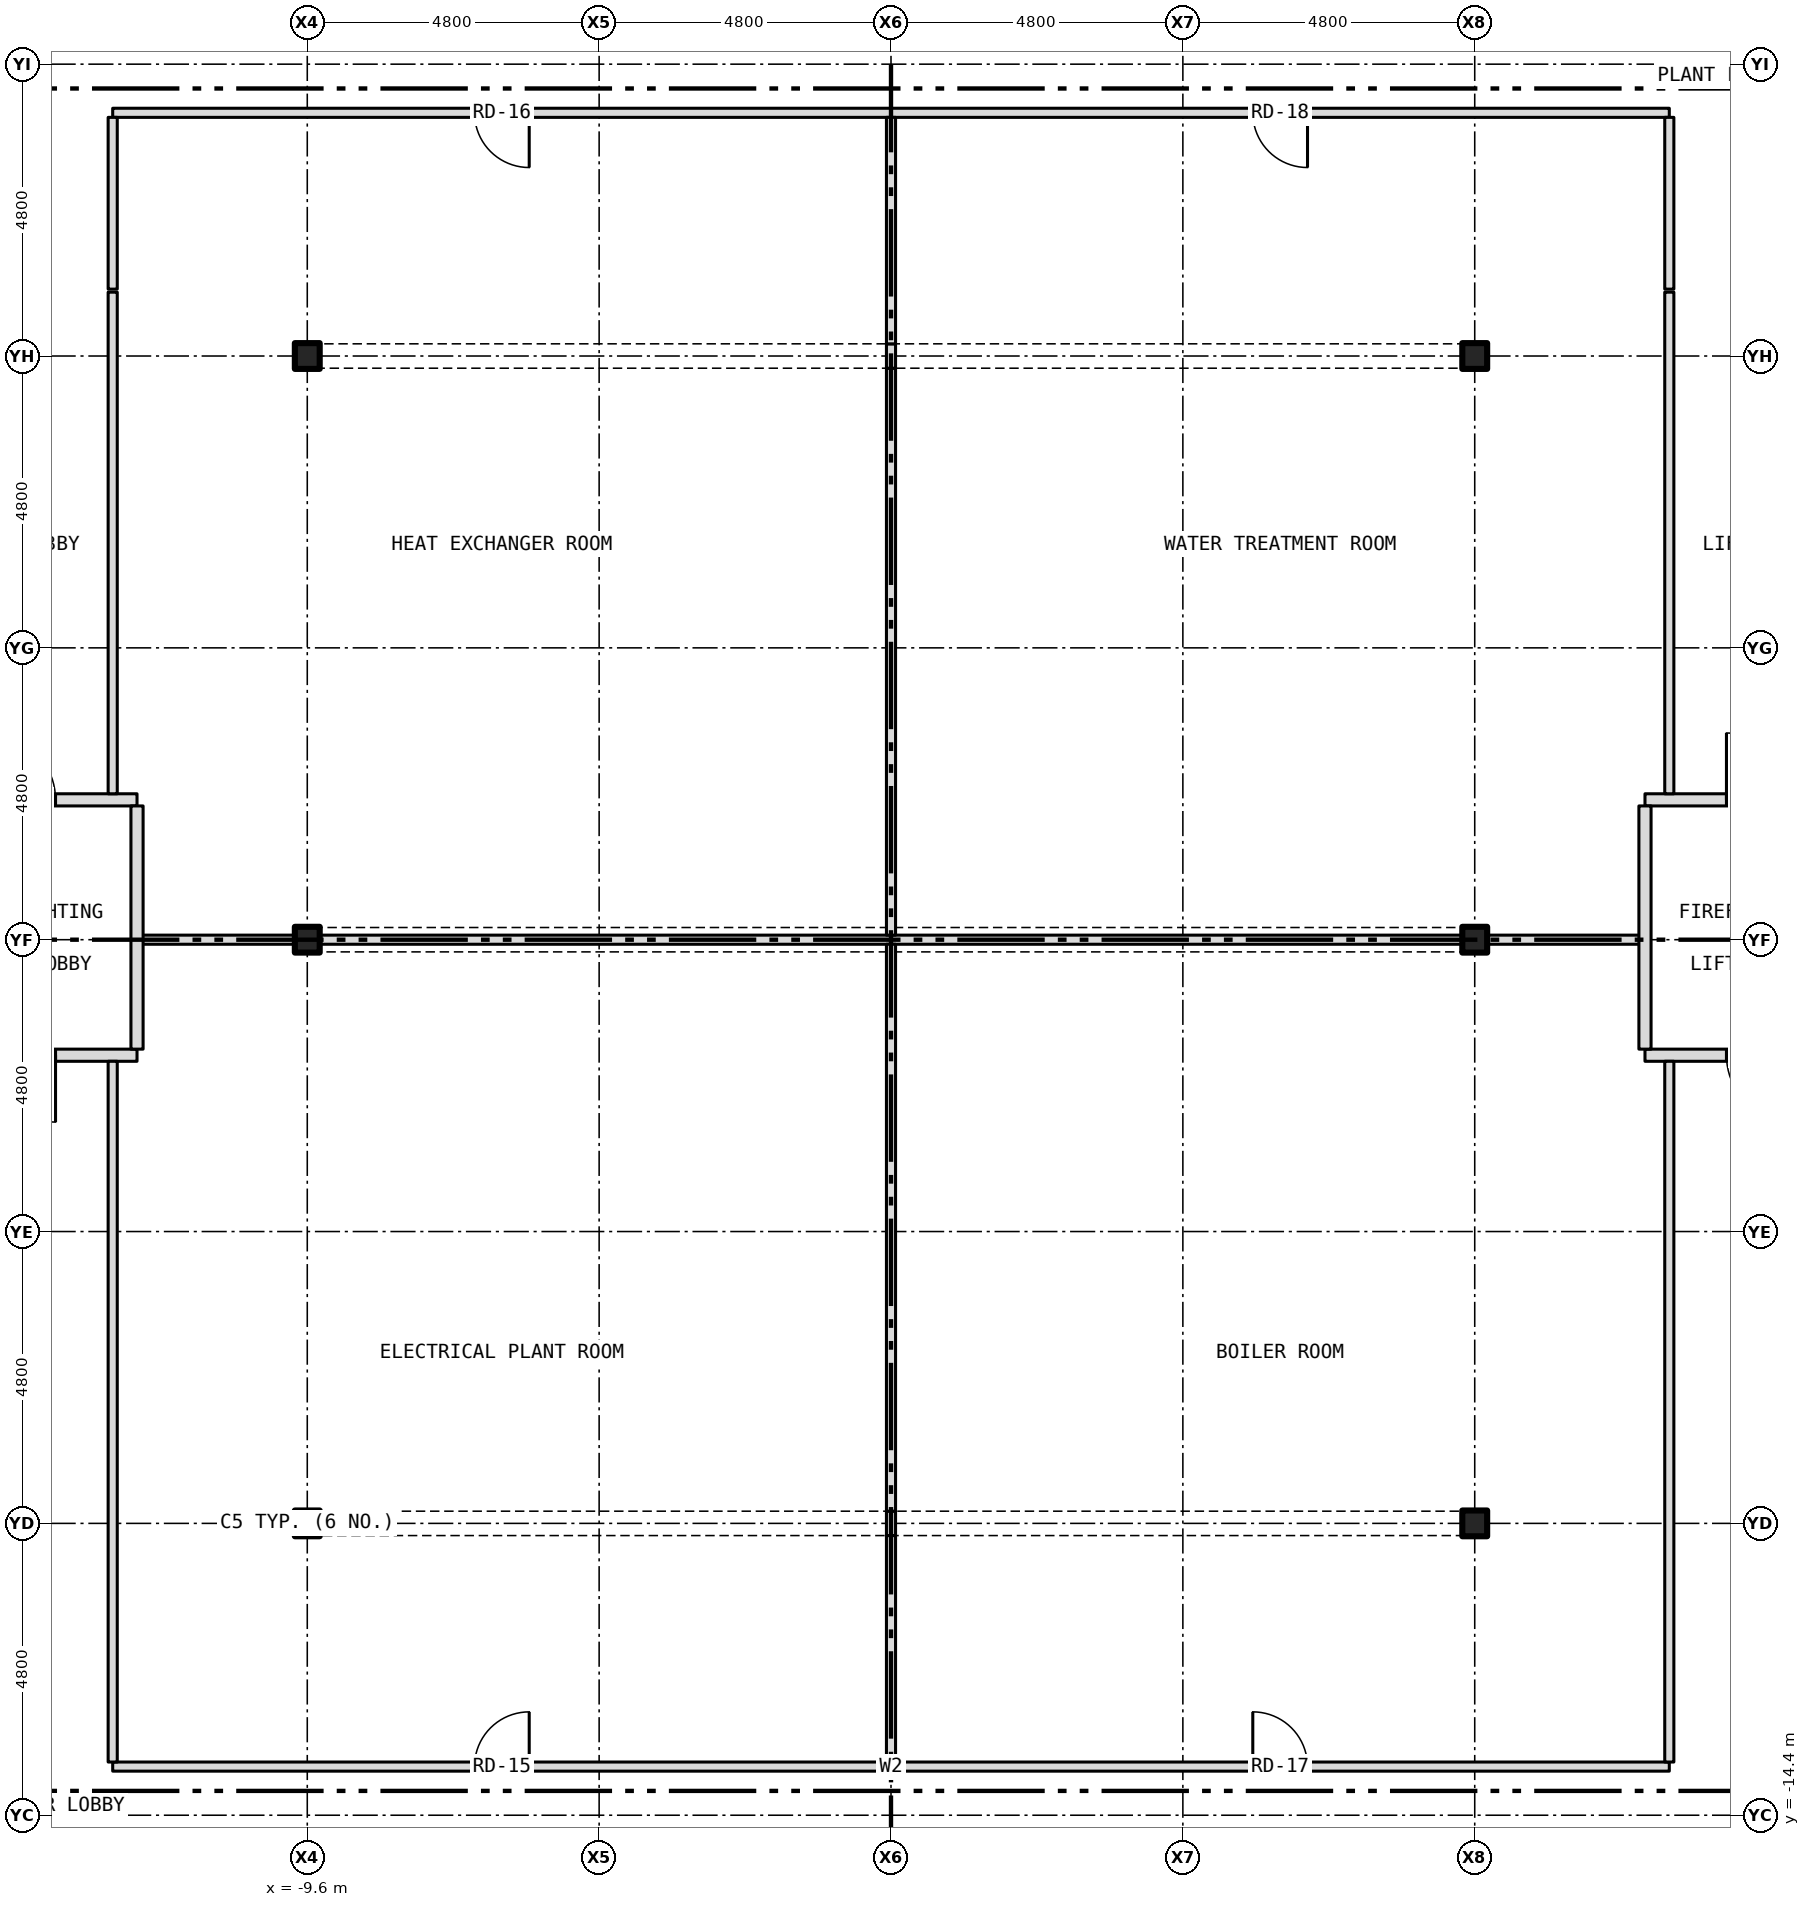
"""IFC4 building model, lengths in metres.
Left out: names, types, materials, properties, quantities, classifications, styles, units other than length and angle.
Written with IfcOpenShell. Run it as: python <this file> out.ifc"""

import sys

from ifc_helpers import new_model, si_unit, direction, frame, frame_2d, origin, origin_2d, place, context, subcontext, project, spatial, rectangle, i_section, extrude, element, fill, save


model = new_model("IFC4")
c1 = context("Model", 3, precision=1e-05, world=origin(), true_north=direction((0.0, 1.0)))
c2 = subcontext(c1, "Body", "Model", "MODEL_VIEW")
j1 = project(units=[si_unit("LENGTHUNIT", "METRE"), si_unit("PLANEANGLEUNIT", "RADIAN")], contexts=[c1])
p1 = place(None, origin())
s1 = spatial("IfcSite", under=j1, at=p1, CompositionType="ELEMENT")
p2 = place(p1, origin())
s2 = spatial("IfcBuilding", under=s1, at=p2, CompositionType="ELEMENT")
p3 = place(p2, frame((0.0, 0.0, 84.5)))
s3 = spatial("IfcBuildingStorey", under=s2, at=p3, CompositionType="ELEMENT", Elevation=84.5)
for number, where, z_axis, x_axis in (
    (1, (-9.6, -9.6, -0.3), (0.0, 0.0, 1.0), (1.0, 0.0, 0.0)),
    (2, (-9.6, 0.0, -0.3), (0.0, 0.0, 1.0), (1.0, 0.0, 0.0)),
    (3, (-9.6, 9.6, -0.3), (0.0, 0.0, 1.0), (1.0, 0.0, 0.0)),
    (4, (9.6, -9.6, -0.3), (0.0, 0.0, 1.0), (1.0, 0.0, 0.0)),
    (5, (9.6, 0.0, -0.3), (0.0, 0.0, 1.0), (1.0, 0.0, 0.0)),
    (6, (9.6, 9.6, -0.3), (0.0, 0.0, 1.0), (1.0, 0.0, 0.0)),
):
    element("IfcColumn", number, at=place(p3, frame(where, z_axis=z_axis, x_axis=x_axis)), inside=s3, PredefinedType="COLUMN", context=c2, shape_type="SweptSolid", body=[
        extrude(i_section(OverallWidth=0.409, OverallDepth=0.424, WebThickness=0.033, FlangeThickness=0.052, at=origin_2d()), origin(), (0.0, 0.0, 1.0), 4.65),
    ])
p4 = place(p3, frame((-12.8, -13.6, 0.0), z_axis=(0.0, 0.0, 1.0), x_axis=(1.0, 0.0, 0.0)))
e7 = element("IfcWall", 7, at=p4, inside=s3, PredefinedType="PARTITIONING", context=c2, shape_type="SweptSolid", body=[
    extrude(rectangle(XDim=25.6, YDim=0.15, at=frame_2d((12.8, 0.0))), origin(), (0.0, 0.0, 1.0), 4.35),
])
p5 = place(p4, frame((5.95, 0.0, 0.0)))
e8 = element("IfcOpeningElement", 8, at=p5, cuts=e7, PredefinedType="OPENING", context=c2, shape_type="SweptSolid", body=[
    extrude(rectangle(XDim=0.9, YDim=2.1, at=frame_2d((0.45, 1.05))), frame((0.0, 0.087, 0.0), z_axis=(0.0, -1.0, 0.0), x_axis=(1.0, 0.0, 0.0)), (0.0, 0.0, 1.0), 0.174),
])
p6 = place(p4, frame((18.75, 0.0, 0.0)))
e9 = element("IfcOpeningElement", 9, at=p6, cuts=e7, PredefinedType="OPENING", context=c2, shape_type="SweptSolid", body=[
    extrude(rectangle(XDim=0.9, YDim=2.1, at=frame_2d((0.45, 1.05))), frame((0.0, 0.087, 0.0), z_axis=(0.0, -1.0, 0.0), x_axis=(1.0, 0.0, 0.0)), (0.0, 0.0, 1.0), 0.174),
])
p7 = place(p3, frame((-15.68, -1.9, 0.0), z_axis=(0.0, 0.0, 1.0), x_axis=(1.0, 0.0, 0.0)))
e10 = element("IfcWall", 10, at=p7, inside=s3, PredefinedType="PARTITIONING", context=c2, shape_type="SweptSolid", body=[
    extrude(rectangle(XDim=3.28, YDim=0.2, at=frame_2d((1.64, 0.0))), origin(), (0.0, 0.0, 1.0), 4.35),
])
p8 = place(p7, frame((0.84, 0.0, 0.0)))
e11 = element("IfcOpeningElement", 11, at=p8, cuts=e10, PredefinedType="OPENING", context=c2, shape_type="SweptSolid", body=[
    extrude(rectangle(XDim=1.1, YDim=2.1, at=frame_2d((0.55, 1.05))), frame((0.0, 0.112, 0.0), z_axis=(0.0, -1.0, 0.0), x_axis=(1.0, 0.0, 0.0)), (0.0, 0.0, 1.0), 0.224),
])
p9 = place(p3, frame((12.4, -1.9, 0.0), z_axis=(0.0, 0.0, 1.0), x_axis=(1.0, 0.0, 0.0)))
e12 = element("IfcWall", 12, at=p9, inside=s3, PredefinedType="PARTITIONING", context=c2, shape_type="SweptSolid", body=[
    extrude(rectangle(XDim=3.28, YDim=0.2, at=frame_2d((1.64, 0.0))), origin(), (0.0, 0.0, 1.0), 4.35),
])
p10 = place(p9, frame((1.34, 0.0, 0.0)))
e13 = element("IfcOpeningElement", 13, at=p10, cuts=e12, PredefinedType="OPENING", context=c2, shape_type="SweptSolid", body=[
    extrude(rectangle(XDim=1.1, YDim=2.1, at=frame_2d((0.55, 1.05))), frame((0.0, 0.112, 0.0), z_axis=(0.0, -1.0, 0.0), x_axis=(1.0, 0.0, 0.0)), (0.0, 0.0, 1.0), 0.224),
])
p11 = place(p3, frame((-12.4, 0.0, 0.0), z_axis=(0.0, 0.0, 1.0), x_axis=(1.0, 0.0, 0.0)))
e14 = element("IfcWall", 14, at=p11, inside=s3, PredefinedType="PARTITIONING", context=c2, shape_type="SweptSolid", body=[
    extrude(rectangle(XDim=2.596, YDim=0.15, at=frame_2d((1.298, 0.0))), origin(), (0.0, 0.0, 1.0), 3.728),
])
p12 = place(p3, frame((-9.804, 0.0, 0.0), z_axis=(0.0, 0.0, 1.0), x_axis=(1.0, 0.0, 0.0)))
e15 = element("IfcWall", 15, at=p12, inside=s3, PredefinedType="PARTITIONING", context=c2, shape_type="SweptSolid", body=[
    extrude(rectangle(XDim=19.608, YDim=0.15, at=frame_2d((9.804, 0.0))), origin(), (0.0, 0.0, 1.0), 4.35),
])
p13 = place(p3, frame((9.804, 0.0, 0.0), z_axis=(0.0, 0.0, 1.0), x_axis=(1.0, 0.0, 0.0)))
e16 = element("IfcWall", 16, at=p13, inside=s3, PredefinedType="PARTITIONING", context=c2, shape_type="SweptSolid", body=[
    extrude(rectangle(XDim=2.596, YDim=0.15, at=frame_2d((1.298, 0.0))), origin(), (0.0, 0.0, 1.0), 3.728),
])
p14 = place(p3, frame((-15.68, 2.3, 0.0), z_axis=(0.0, 0.0, 1.0), x_axis=(1.0, 0.0, 0.0)))
e17 = element("IfcWall", 17, at=p14, inside=s3, PredefinedType="PARTITIONING", context=c2, shape_type="SweptSolid", body=[
    extrude(rectangle(XDim=3.28, YDim=0.2, at=frame_2d((1.64, 0.0))), origin(), (0.0, 0.0, 1.0), 4.35),
])
p15 = place(p14, frame((0.84, 0.0, 0.0)))
e18 = element("IfcOpeningElement", 18, at=p15, cuts=e17, PredefinedType="OPENING", context=c2, shape_type="SweptSolid", body=[
    extrude(rectangle(XDim=1.1, YDim=2.1, at=frame_2d((0.55, 1.05))), frame((0.0, 0.112, 0.0), z_axis=(0.0, -1.0, 0.0), x_axis=(1.0, 0.0, 0.0)), (0.0, 0.0, 1.0), 0.224),
])
p16 = place(p3, frame((12.4, 2.3, 0.0), z_axis=(0.0, 0.0, 1.0), x_axis=(1.0, 0.0, 0.0)))
e19 = element("IfcWall", 19, at=p16, inside=s3, PredefinedType="PARTITIONING", context=c2, shape_type="SweptSolid", body=[
    extrude(rectangle(XDim=3.28, YDim=0.2, at=frame_2d((1.64, 0.0))), origin(), (0.0, 0.0, 1.0), 4.35),
])
p17 = place(p16, frame((1.34, 0.0, 0.0)))
e20 = element("IfcOpeningElement", 20, at=p17, cuts=e19, PredefinedType="OPENING", context=c2, shape_type="SweptSolid", body=[
    extrude(rectangle(XDim=1.1, YDim=2.1, at=frame_2d((0.55, 1.05))), frame((0.0, 0.112, 0.0), z_axis=(0.0, -1.0, 0.0), x_axis=(1.0, 0.0, 0.0)), (0.0, 0.0, 1.0), 0.224),
])
p18 = place(p3, frame((-12.8, 13.6, 0.0), z_axis=(0.0, 0.0, 1.0), x_axis=(1.0, 0.0, 0.0)))
e21 = element("IfcWall", 21, at=p18, inside=s3, PredefinedType="PARTITIONING", context=c2, shape_type="SweptSolid", body=[
    extrude(rectangle(XDim=25.6, YDim=0.15, at=frame_2d((12.8, 0.0))), origin(), (0.0, 0.0, 1.0), 4.35),
])
p19 = place(p18, frame((5.95, 0.0, 0.0)))
e22 = element("IfcOpeningElement", 22, at=p19, cuts=e21, PredefinedType="OPENING", context=c2, shape_type="SweptSolid", body=[
    extrude(rectangle(XDim=0.9, YDim=2.1, at=frame_2d((0.45, 1.05))), frame((0.0, 0.087, 0.0), z_axis=(0.0, -1.0, 0.0), x_axis=(1.0, 0.0, 0.0)), (0.0, 0.0, 1.0), 0.174),
])
p20 = place(p18, frame((18.75, 0.0, 0.0)))
e23 = element("IfcOpeningElement", 23, at=p20, cuts=e21, PredefinedType="OPENING", context=c2, shape_type="SweptSolid", body=[
    extrude(rectangle(XDim=0.9, YDim=2.1, at=frame_2d((0.45, 1.05))), frame((0.0, 0.087, 0.0), z_axis=(0.0, -1.0, 0.0), x_axis=(1.0, 0.0, 0.0)), (0.0, 0.0, 1.0), 0.174),
])
p21 = place(p3, frame((-12.8, -13.525, 0.0), z_axis=(0.0, 0.0, 1.0), x_axis=(0.0, 1.0, 0.0)))
e24 = element("IfcWall", 24, at=p21, inside=s3, PredefinedType="PARTITIONING", context=c2, shape_type="SweptSolid", body=[
    extrude(rectangle(XDim=11.525, YDim=0.15, at=frame_2d((5.762, 0.0))), origin(), (0.0, 0.0, 1.0), 4.35),
])
p22 = place(p3, frame((-12.8, 2.4, 0.0), z_axis=(0.0, 0.0, 1.0), x_axis=(0.0, 1.0, 0.0)))
e25 = element("IfcWall", 25, at=p22, inside=s3, PredefinedType="PARTITIONING", context=c2, shape_type="SweptSolid", body=[
    extrude(rectangle(XDim=8.25, YDim=0.15, at=frame_2d((4.125, 0.0))), origin(), (0.0, 0.0, 1.0), 4.35),
])
p23 = place(p3, frame((-12.8, 10.7, 0.0), z_axis=(0.0, 0.0, 1.0), x_axis=(0.0, 1.0, 0.0)))
e26 = element("IfcWall", 26, at=p23, inside=s3, PredefinedType="PARTITIONING", context=c2, shape_type="SweptSolid", body=[
    extrude(rectangle(XDim=2.825, YDim=0.15, at=frame_2d((1.413, 0.0))), origin(), (0.0, 0.0, 1.0), 4.35),
])
p24 = place(p3, frame((-12.4, -1.8, 0.0), z_axis=(0.0, 0.0, 1.0), x_axis=(0.0, 1.0, 0.0)))
e27 = element("IfcWall", 27, at=p24, inside=s3, PredefinedType="PARTITIONING", context=c2, shape_type="SweptSolid", body=[
    extrude(rectangle(XDim=4.0, YDim=0.2, at=frame_2d((2.0, 0.0))), origin(), (0.0, 0.0, 1.0), 4.35),
])
p25 = place(p3, frame((0.0, -13.525, 0.0), z_axis=(0.0, 0.0, 1.0), x_axis=(0.0, 1.0, 0.0)))
e28 = element("IfcWall", 28, at=p25, inside=s3, PredefinedType="PARTITIONING", context=c2, shape_type="SweptSolid", body=[
    extrude(rectangle(XDim=3.725, YDim=0.15, at=frame_2d((1.862, 0.0))), origin(), (0.0, 0.0, 1.0), 3.728),
])
p26 = place(p3, frame((0.0, -9.8, 0.0), z_axis=(0.0, 0.0, 1.0), x_axis=(0.0, 1.0, 0.0)))
e29 = element("IfcWall", 29, at=p26, inside=s3, PredefinedType="PARTITIONING", context=c2, shape_type="SweptSolid", body=[
    extrude(rectangle(XDim=0.401, YDim=0.15, at=frame_2d((0.201, 0.0))), origin(), (0.0, 0.0, 1.0), 4.35),
])
for number, where, z_axis, x_axis in (
    (30, (0.0, -9.399, 0.0), (0.0, 0.0, 1.0), (0.0, 1.0, 0.0)),
    (31, (0.0, 0.075, 0.0), (0.0, 0.0, 1.0), (0.0, 1.0, 0.0)),
):
    element("IfcWall", number, at=place(p3, frame(where, z_axis=z_axis, x_axis=x_axis)), inside=s3, PredefinedType="PARTITIONING", context=c2, shape_type="SweptSolid", body=[
        extrude(rectangle(XDim=9.324, YDim=0.15, at=frame_2d((4.662, 0.0))), origin(), (0.0, 0.0, 1.0), 3.728),
    ])
p27 = place(p3, frame((0.0, 9.399, 0.0), z_axis=(0.0, 0.0, 1.0), x_axis=(0.0, 1.0, 0.0)))
e32 = element("IfcWall", 32, at=p27, inside=s3, PredefinedType="PARTITIONING", context=c2, shape_type="SweptSolid", body=[
    extrude(rectangle(XDim=0.401, YDim=0.15, at=frame_2d((0.201, 0.0))), origin(), (0.0, 0.0, 1.0), 4.35),
])
p28 = place(p3, frame((0.0, 9.8, 0.0), z_axis=(0.0, 0.0, 1.0), x_axis=(0.0, 1.0, 0.0)))
e33 = element("IfcWall", 33, at=p28, inside=s3, PredefinedType="PARTITIONING", context=c2, shape_type="SweptSolid", body=[
    extrude(rectangle(XDim=3.725, YDim=0.15, at=frame_2d((1.862, 0.0))), origin(), (0.0, 0.0, 1.0), 3.728),
])
p29 = place(p3, frame((12.4, -1.8, 0.0), z_axis=(0.0, 0.0, 1.0), x_axis=(0.0, 1.0, 0.0)))
e34 = element("IfcWall", 34, at=p29, inside=s3, PredefinedType="PARTITIONING", context=c2, shape_type="SweptSolid", body=[
    extrude(rectangle(XDim=4.0, YDim=0.2, at=frame_2d((2.0, 0.0))), origin(), (0.0, 0.0, 1.0), 4.35),
])
p30 = place(p3, frame((12.8, -13.525, 0.0), z_axis=(0.0, 0.0, 1.0), x_axis=(0.0, 1.0, 0.0)))
e35 = element("IfcWall", 35, at=p30, inside=s3, PredefinedType="PARTITIONING", context=c2, shape_type="SweptSolid", body=[
    extrude(rectangle(XDim=11.525, YDim=0.15, at=frame_2d((5.762, 0.0))), origin(), (0.0, 0.0, 1.0), 4.35),
])
p31 = place(p3, frame((12.8, 2.4, 0.0), z_axis=(0.0, 0.0, 1.0), x_axis=(0.0, 1.0, 0.0)))
e36 = element("IfcWall", 36, at=p31, inside=s3, PredefinedType="PARTITIONING", context=c2, shape_type="SweptSolid", body=[
    extrude(rectangle(XDim=8.25, YDim=0.15, at=frame_2d((4.125, 0.0))), origin(), (0.0, 0.0, 1.0), 4.35),
])
p32 = place(p3, frame((12.8, 10.7, 0.0), z_axis=(0.0, 0.0, 1.0), x_axis=(0.0, 1.0, 0.0)))
e37 = element("IfcWall", 37, at=p32, inside=s3, PredefinedType="PARTITIONING", context=c2, shape_type="SweptSolid", body=[
    extrude(rectangle(XDim=2.825, YDim=0.15, at=frame_2d((1.413, 0.0))), origin(), (0.0, 0.0, 1.0), 4.35),
])
p33 = place(p15, origin())
e38 = element("IfcDoor", 38, at=p33, inside=s3, OperationType="SINGLE_SWING_LEFT", PredefinedType="DOOR", context=c2, shape_type="SweptSolid", body=[
    extrude(rectangle(XDim=1.1, YDim=2.1, at=frame_2d((0.55, 1.05))), frame((0.0, 0.025, 0.0), z_axis=(0.0, -1.0, 0.0), x_axis=(1.0, 0.0, 0.0)), (0.0, 0.0, 1.0), 0.05),
])
fill(e18, e38)
p34 = place(p8, origin())
e39 = element("IfcDoor", 39, at=p34, inside=s3, OperationType="SINGLE_SWING_RIGHT", PredefinedType="DOOR", context=c2, shape_type="SweptSolid", body=[
    extrude(rectangle(XDim=1.1, YDim=2.1, at=frame_2d((0.55, 1.05))), frame((0.0, 0.025, 0.0), z_axis=(0.0, -1.0, 0.0), x_axis=(1.0, 0.0, 0.0)), (0.0, 0.0, 1.0), 0.05),
])
fill(e11, e39)
p35 = place(p17, origin())
e40 = element("IfcDoor", 40, at=p35, inside=s3, OperationType="SINGLE_SWING_LEFT", PredefinedType="DOOR", context=c2, shape_type="SweptSolid", body=[
    extrude(rectangle(XDim=1.1, YDim=2.1, at=frame_2d((0.55, 1.05))), frame((0.0, 0.025, 0.0), z_axis=(0.0, -1.0, 0.0), x_axis=(1.0, 0.0, 0.0)), (0.0, 0.0, 1.0), 0.05),
])
fill(e20, e40)
p36 = place(p10, origin())
e41 = element("IfcDoor", 41, at=p36, inside=s3, OperationType="SINGLE_SWING_RIGHT", PredefinedType="DOOR", context=c2, shape_type="SweptSolid", body=[
    extrude(rectangle(XDim=1.1, YDim=2.1, at=frame_2d((0.55, 1.05))), frame((0.0, 0.025, 0.0), z_axis=(0.0, -1.0, 0.0), x_axis=(1.0, 0.0, 0.0)), (0.0, 0.0, 1.0), 0.05),
])
fill(e13, e41)
p37 = place(p5, origin())
e42 = element("IfcDoor", 42, at=p37, inside=s3, OperationType="SINGLE_SWING_RIGHT", PredefinedType="DOOR", context=c2, shape_type="SweptSolid", body=[
    extrude(rectangle(XDim=0.9, YDim=2.1, at=frame_2d((0.45, 1.05))), frame((0.0, 0.025, 0.0), z_axis=(0.0, -1.0, 0.0), x_axis=(1.0, 0.0, 0.0)), (0.0, 0.0, 1.0), 0.05),
])
fill(e8, e42)
p38 = place(p19, origin())
e43 = element("IfcDoor", 43, at=p38, inside=s3, OperationType="SINGLE_SWING_RIGHT", PredefinedType="DOOR", context=c2, shape_type="SweptSolid", body=[
    extrude(rectangle(XDim=0.9, YDim=2.1, at=frame_2d((0.45, 1.05))), frame((0.0, 0.025, 0.0), z_axis=(0.0, -1.0, 0.0), x_axis=(1.0, 0.0, 0.0)), (0.0, 0.0, 1.0), 0.05),
])
fill(e22, e43)
p39 = place(p6, origin())
e44 = element("IfcDoor", 44, at=p39, inside=s3, OperationType="SINGLE_SWING_LEFT", PredefinedType="DOOR", context=c2, shape_type="SweptSolid", body=[
    extrude(rectangle(XDim=0.9, YDim=2.1, at=frame_2d((0.45, 1.05))), frame((0.0, 0.025, 0.0), z_axis=(0.0, -1.0, 0.0), x_axis=(1.0, 0.0, 0.0)), (0.0, 0.0, 1.0), 0.05),
])
fill(e9, e44)
p40 = place(p20, origin())
e45 = element("IfcDoor", 45, at=p40, inside=s3, OperationType="SINGLE_SWING_RIGHT", PredefinedType="DOOR", context=c2, shape_type="SweptSolid", body=[
    extrude(rectangle(XDim=0.9, YDim=2.1, at=frame_2d((0.45, 1.05))), frame((0.0, 0.025, 0.0), z_axis=(0.0, -1.0, 0.0), x_axis=(1.0, 0.0, 0.0)), (0.0, 0.0, 1.0), 0.05),
])
fill(e23, e45)
save(model, sys.argv[1])
